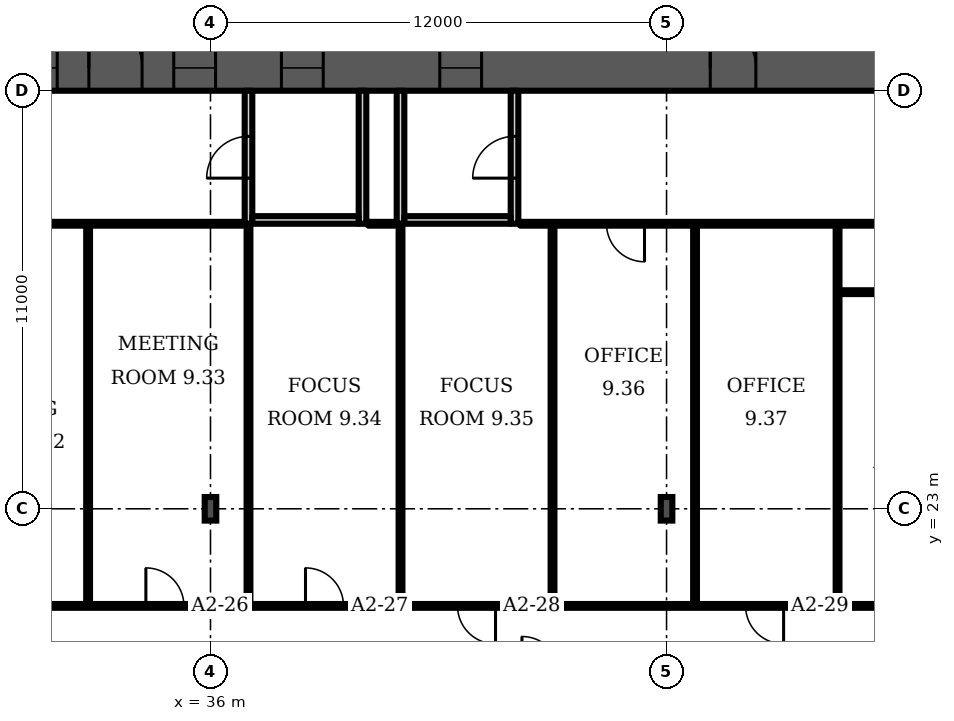
"""IFC4 building model, lengths in metres.
Left out: names, types, materials, properties, quantities, classifications, styles, units other than length and angle.
Written with IfcOpenShell. Run it as: python <this file> out.ifc"""

import sys

from ifc_helpers import new_model, si_unit, direction, frame, frame_2d, origin, origin_2d, place, context, subcontext, project, spatial, rectangle, i_section, extrude, element, fill, save


model = new_model("IFC4")
c1 = context("Model", 3, precision=1e-05, world=origin(), true_north=direction((0.0, 1.0)))
c2 = subcontext(c1, "Body", "Model", "MODEL_VIEW")
j1 = project(units=[si_unit("LENGTHUNIT", "METRE"), si_unit("PLANEANGLEUNIT", "RADIAN")], contexts=[c1])
p1 = place(None, origin())
s1 = spatial("IfcSite", under=j1, at=p1, CompositionType="ELEMENT")
p2 = place(p1, origin())
s2 = spatial("IfcBuilding", under=s1, at=p2, CompositionType="ELEMENT")
p3 = place(p2, frame((0.0, 0.0, 52.3)))
s3 = spatial("IfcBuildingStorey", under=s2, at=p3, CompositionType="ELEMENT", Elevation=52.3)
p4 = place(p3, frame((9.0, 34.6, 0.0), z_axis=(0.0, 0.0, 1.0), x_axis=(1.0, 0.0, 0.0)))
e1 = element("IfcWall", 1, at=p4, inside=s3, PredefinedType="SHEAR", context=c2, shape_type="SweptSolid", body=[
    extrude(rectangle(XDim=56.0, YDim=1.2, at=frame_2d((28.0, 0.0))), origin(), (0.0, 0.0, 1.0), 3.6),
])
p5 = place(p4, frame((2.0, 0.0, 0.0)))
e2 = element("IfcOpeningElement", 2, at=p5, cuts=e1, PredefinedType="OPENING", context=c2, shape_type="SweptSolid", body=[
    extrude(rectangle(XDim=1.0, YDim=2.1, at=frame_2d((0.5, 1.05))), frame((0.0, 0.61, 0.0), z_axis=(0.0, -1.0, 0.0), x_axis=(1.0, 0.0, 0.0)), (0.0, 0.0, 1.0), 1.22),
])
p6 = place(p4, frame((4.6, 0.0, 0.0)))
e3 = element("IfcOpeningElement", 3, at=p6, cuts=e1, PredefinedType="OPENING", context=c2, shape_type="SweptSolid", body=[
    extrude(rectangle(XDim=1.0, YDim=2.1, at=frame_2d((0.5, 1.05))), frame((0.0, 0.61, 0.0), z_axis=(0.0, -1.0, 0.0), x_axis=(1.0, 0.0, 0.0)), (0.0, 0.0, 1.0), 1.22),
])
p7 = place(p4, frame((7.867, 0.0, 0.0)))
e4 = element("IfcOpeningElement", 4, at=p7, cuts=e1, PredefinedType="OPENING", context=c2, shape_type="SweptSolid", body=[
    extrude(rectangle(XDim=1.1, YDim=2.1, at=frame_2d((0.55, 1.05))), frame((0.0, 0.61, 0.0), z_axis=(0.0, -1.0, 0.0), x_axis=(1.0, 0.0, 0.0)), (0.0, 0.0, 1.0), 1.22),
])
p8 = place(p4, frame((12.033, 0.0, 0.0)))
e5 = element("IfcOpeningElement", 5, at=p8, cuts=e1, PredefinedType="OPENING", context=c2, shape_type="SweptSolid", body=[
    extrude(rectangle(XDim=1.1, YDim=2.1, at=frame_2d((0.55, 1.05))), frame((0.0, 0.61, 0.0), z_axis=(0.0, -1.0, 0.0), x_axis=(1.0, 0.0, 0.0)), (0.0, 0.0, 1.0), 1.22),
])
p9 = place(p4, frame((9.8, 0.0, 0.0)))
e6 = element("IfcOpeningElement", 6, at=p9, cuts=e1, PredefinedType="OPENING", context=c2, shape_type="SweptSolid", body=[
    extrude(rectangle(XDim=1.4, YDim=2.1, at=frame_2d((0.7, 1.05))), frame((0.0, 0.61, 0.0), z_axis=(0.0, -1.0, 0.0), x_axis=(1.0, 0.0, 0.0)), (0.0, 0.0, 1.0), 1.22),
])
p10 = place(p4, frame((14.65, 0.0, 0.0)))
e7 = element("IfcOpeningElement", 7, at=p10, cuts=e1, PredefinedType="OPENING", context=c2, shape_type="SweptSolid", body=[
    extrude(rectangle(XDim=1.2, YDim=2.1, at=frame_2d((0.6, 1.05))), frame((0.0, 0.61, 0.0), z_axis=(0.0, -1.0, 0.0), x_axis=(1.0, 0.0, 0.0)), (0.0, 0.0, 1.0), 1.22),
])
p11 = place(p4, frame((21.867, 0.0, 0.0)))
e8 = element("IfcOpeningElement", 8, at=p11, cuts=e1, PredefinedType="OPENING", context=c2, shape_type="SweptSolid", body=[
    extrude(rectangle(XDim=1.1, YDim=2.1, at=frame_2d((0.55, 1.05))), frame((0.0, 0.61, 0.0), z_axis=(0.0, -1.0, 0.0), x_axis=(1.0, 0.0, 0.0)), (0.0, 0.0, 1.0), 1.22),
])
p12 = place(p4, frame((26.033, 0.0, 0.0)))
e9 = element("IfcOpeningElement", 9, at=p12, cuts=e1, PredefinedType="OPENING", context=c2, shape_type="SweptSolid", body=[
    extrude(rectangle(XDim=1.1, YDim=2.1, at=frame_2d((0.55, 1.05))), frame((0.0, 0.61, 0.0), z_axis=(0.0, -1.0, 0.0), x_axis=(1.0, 0.0, 0.0)), (0.0, 0.0, 1.0), 1.22),
])
p13 = place(p4, frame((23.8, 0.0, 0.0)))
e10 = element("IfcOpeningElement", 10, at=p13, cuts=e1, PredefinedType="OPENING", context=c2, shape_type="SweptSolid", body=[
    extrude(rectangle(XDim=1.4, YDim=2.1, at=frame_2d((0.7, 1.05))), frame((0.0, 0.61, 0.0), z_axis=(0.0, -1.0, 0.0), x_axis=(1.0, 0.0, 0.0)), (0.0, 0.0, 1.0), 1.22),
])
p14 = place(p4, frame((28.867, 0.0, 0.0)))
e11 = element("IfcOpeningElement", 11, at=p14, cuts=e1, PredefinedType="OPENING", context=c2, shape_type="SweptSolid", body=[
    extrude(rectangle(XDim=1.1, YDim=2.1, at=frame_2d((0.55, 1.05))), frame((0.0, 0.61, 0.0), z_axis=(0.0, -1.0, 0.0), x_axis=(1.0, 0.0, 0.0)), (0.0, 0.0, 1.0), 1.22),
])
p15 = place(p4, frame((33.033, 0.0, 0.0)))
e12 = element("IfcOpeningElement", 12, at=p15, cuts=e1, PredefinedType="OPENING", context=c2, shape_type="SweptSolid", body=[
    extrude(rectangle(XDim=1.1, YDim=2.1, at=frame_2d((0.55, 1.05))), frame((0.0, 0.61, 0.0), z_axis=(0.0, -1.0, 0.0), x_axis=(1.0, 0.0, 0.0)), (0.0, 0.0, 1.0), 1.22),
])
p16 = place(p4, frame((40.15, 0.0, 0.0)))
e13 = element("IfcOpeningElement", 13, at=p16, cuts=e1, PredefinedType="OPENING", context=c2, shape_type="SweptSolid", body=[
    extrude(rectangle(XDim=1.2, YDim=2.1, at=frame_2d((0.6, 1.05))), frame((0.0, 0.61, 0.0), z_axis=(0.0, -1.0, 0.0), x_axis=(1.0, 0.0, 0.0)), (0.0, 0.0, 1.0), 1.22),
])
p17 = place(p4, frame((44.8, 0.0, 0.0)))
e14 = element("IfcOpeningElement", 14, at=p17, cuts=e1, PredefinedType="OPENING", context=c2, shape_type="SweptSolid", body=[
    extrude(rectangle(XDim=1.4, YDim=2.1, at=frame_2d((0.7, 1.05))), frame((0.0, 0.61, 0.0), z_axis=(0.0, -1.0, 0.0), x_axis=(1.0, 0.0, 0.0)), (0.0, 0.0, 1.0), 1.22),
])
p18 = place(p4, frame((49.867, 0.0, 0.0)))
e15 = element("IfcOpeningElement", 15, at=p18, cuts=e1, PredefinedType="OPENING", context=c2, shape_type="SweptSolid", body=[
    extrude(rectangle(XDim=1.1, YDim=2.1, at=frame_2d((0.55, 1.05))), frame((0.0, 0.61, 0.0), z_axis=(0.0, -1.0, 0.0), x_axis=(1.0, 0.0, 0.0)), (0.0, 0.0, 1.0), 1.22),
])
p19 = place(p4, frame((53.5, 0.0, 0.0)))
e16 = element("IfcOpeningElement", 16, at=p19, cuts=e1, PredefinedType="OPENING", context=c2, shape_type="SweptSolid", body=[
    extrude(rectangle(XDim=1.1, YDim=2.1, at=frame_2d((0.55, 1.05))), frame((0.0, 0.61, 0.0), z_axis=(0.0, -1.0, 0.0), x_axis=(1.0, 0.0, 0.0)), (0.0, 0.0, 1.0), 1.22),
])
p20 = place(p4, frame((51.567, 0.0, 0.0)))
e17 = element("IfcOpeningElement", 17, at=p20, cuts=e1, PredefinedType="OPENING", context=c2, shape_type="SweptSolid", body=[
    extrude(rectangle(XDim=1.4, YDim=2.1, at=frame_2d((0.7, 1.05))), frame((0.0, 0.61, 0.0), z_axis=(0.0, -1.0, 0.0), x_axis=(1.0, 0.0, 0.0)), (0.0, 0.0, 1.0), 1.22),
])
for number, where, z_axis, x_axis in (
    (18, (36.0, 23.0, 0.0), (0.0, 0.0, 1.0), (1.0, 0.0, 0.0)),
    (19, (48.0, 23.0, 0.0), (0.0, 0.0, 1.0), (1.0, 0.0, 0.0)),
):
    element("IfcColumn", number, at=place(p3, frame(where, z_axis=z_axis, x_axis=x_axis)), inside=s3, PredefinedType="COLUMN", context=c2, shape_type="SweptSolid", body=[
        extrude(i_section(OverallWidth=0.305, OverallDepth=0.62, WebThickness=0.021, FlangeThickness=0.04, FilletRadius=0.027, at=origin_2d()), origin(), (0.0, 0.0, 1.0), 3.6),
    ])
p21 = place(p3, frame((37.0, 30.5, 0.0), z_axis=(0.0, 0.0, 1.0), x_axis=(0.0, 1.0, 0.0)))
e20 = element("IfcWall", 20, at=p21, inside=s3, PredefinedType="PARTITIONING", context=c2, shape_type="SweptSolid", body=[
    extrude(rectangle(XDim=3.5, YDim=0.2, at=frame_2d((1.75, 0.0))), origin(), (0.0, 0.0, 1.0), 3.2),
])
p22 = place(p21, frame((1.2, 0.0, 0.0)))
e21 = element("IfcOpeningElement", 21, at=p22, cuts=e20, PredefinedType="OPENING", context=c2, shape_type="SweptSolid", body=[
    extrude(rectangle(XDim=1.1, YDim=2.1, at=frame_2d((0.55, 1.05))), frame((0.0, 0.11, 0.0), z_axis=(0.0, -1.0, 0.0), x_axis=(1.0, 0.0, 0.0)), (0.0, 0.0, 1.0), 0.22),
])
p23 = place(p3, frame((40.0, 30.5, 0.0), z_axis=(0.0, 0.0, 1.0), x_axis=(0.0, 1.0, 0.0)))
e22 = element("IfcWall", 22, at=p23, inside=s3, PredefinedType="PARTITIONING", context=c2, shape_type="SweptSolid", body=[
    extrude(rectangle(XDim=3.5, YDim=0.2, at=frame_2d((1.75, 0.0))), origin(), (0.0, 0.0, 1.0), 3.2),
])
p24 = place(p3, frame((37.1, 30.6, 0.0), z_axis=(0.0, 0.0, 1.0), x_axis=(1.0, 0.0, 0.0)))
e23 = element("IfcWall", 23, at=p24, inside=s3, PredefinedType="PARTITIONING", context=c2, shape_type="SweptSolid", body=[
    extrude(rectangle(XDim=2.8, YDim=0.2, at=frame_2d((1.4, 0.0))), origin(), (0.0, 0.0, 1.0), 3.2),
])
p25 = place(p3, frame((41.0, 30.5, 0.0), z_axis=(0.0, 0.0, 1.0), x_axis=(0.0, 1.0, 0.0)))
e24 = element("IfcWall", 24, at=p25, inside=s3, PredefinedType="PARTITIONING", context=c2, shape_type="SweptSolid", body=[
    extrude(rectangle(XDim=3.5, YDim=0.2, at=frame_2d((1.75, 0.0))), origin(), (0.0, 0.0, 1.0), 3.2),
])
p26 = place(p3, frame((44.0, 30.5, 0.0), z_axis=(0.0, 0.0, 1.0), x_axis=(0.0, 1.0, 0.0)))
e25 = element("IfcWall", 25, at=p26, inside=s3, PredefinedType="PARTITIONING", context=c2, shape_type="SweptSolid", body=[
    extrude(rectangle(XDim=3.5, YDim=0.2, at=frame_2d((1.75, 0.0))), origin(), (0.0, 0.0, 1.0), 3.2),
])
p27 = place(p26, frame((1.2, 0.0, 0.0)))
e26 = element("IfcOpeningElement", 26, at=p27, cuts=e25, PredefinedType="OPENING", context=c2, shape_type="SweptSolid", body=[
    extrude(rectangle(XDim=1.1, YDim=2.1, at=frame_2d((0.55, 1.05))), frame((0.0, 0.11, 0.0), z_axis=(0.0, -1.0, 0.0), x_axis=(1.0, 0.0, 0.0)), (0.0, 0.0, 1.0), 0.22),
])
p28 = place(p3, frame((41.1, 30.6, 0.0), z_axis=(0.0, 0.0, 1.0), x_axis=(1.0, 0.0, 0.0)))
e27 = element("IfcWall", 27, at=p28, inside=s3, PredefinedType="PARTITIONING", context=c2, shape_type="SweptSolid", body=[
    extrude(rectangle(XDim=2.8, YDim=0.2, at=frame_2d((1.4, 0.0))), origin(), (0.0, 0.0, 1.0), 3.2),
])
p29 = place(p3, frame((11.2, 30.5, 0.0), z_axis=(0.0, 0.0, 1.0), x_axis=(1.0, 0.0, 0.0)))
e28 = element("IfcWall", 28, at=p29, inside=s3, PredefinedType="PARTITIONING", context=c2, shape_type="SweptSolid", body=[
    extrude(rectangle(XDim=25.65, YDim=0.1, at=frame_2d((12.825, 0.0))), origin(), (0.0, 0.0, 1.0), 3.2),
])
p30 = place(p29, frame((0.195, 0.0, 0.0)))
e29 = element("IfcOpeningElement", 29, at=p30, cuts=e28, PredefinedType="OPENING", context=c2, shape_type="SweptSolid", body=[
    extrude(rectangle(XDim=1.0, YDim=2.1, at=frame_2d((0.5, 1.05))), frame((0.0, 0.06, 0.0), z_axis=(0.0, -1.0, 0.0), x_axis=(1.0, 0.0, 0.0)), (0.0, 0.0, 1.0), 0.12),
])
p31 = place(p29, frame((14.755, 0.0, 0.0)))
e30 = element("IfcOpeningElement", 30, at=p31, cuts=e28, PredefinedType="OPENING", context=c2, shape_type="SweptSolid", body=[
    extrude(rectangle(XDim=1.0, YDim=2.1, at=frame_2d((0.5, 1.05))), frame((0.0, 0.06, 0.0), z_axis=(0.0, -1.0, 0.0), x_axis=(1.0, 0.0, 0.0)), (0.0, 0.0, 1.0), 0.12),
])
p32 = place(p29, frame((18.975, 0.0, 0.0)))
e31 = element("IfcOpeningElement", 31, at=p32, cuts=e28, PredefinedType="OPENING", context=c2, shape_type="SweptSolid", body=[
    extrude(rectangle(XDim=1.0, YDim=2.1, at=frame_2d((0.5, 1.05))), frame((0.0, 0.06, 0.0), z_axis=(0.0, -1.0, 0.0), x_axis=(1.0, 0.0, 0.0)), (0.0, 0.0, 1.0), 0.12),
])
p33 = place(p3, frame((11.505, 20.445, 0.0), z_axis=(0.0, 0.0, 1.0), x_axis=(1.0, 0.0, 0.0)))
e32 = element("IfcWall", 32, at=p33, inside=s3, PredefinedType="PARTITIONING", context=c2, shape_type="SweptSolid", body=[
    extrude(rectangle(XDim=58.82, YDim=0.1, at=frame_2d((29.41, 0.0))), origin(), (0.0, 0.0, 1.0), 3.2),
])
p34 = place(p33, frame((0.21, 0.0, 0.0)))
e33 = element("IfcOpeningElement", 33, at=p34, cuts=e32, PredefinedType="OPENING", context=c2, shape_type="SweptSolid", body=[
    extrude(rectangle(XDim=1.0, YDim=2.1, at=frame_2d((0.5, 1.05))), frame((0.0, 0.06, 0.0), z_axis=(0.0, -1.0, 0.0), x_axis=(1.0, 0.0, 0.0)), (0.0, 0.0, 1.0), 0.12),
])
p35 = place(p33, frame((8.33, 0.0, 0.0)))
e34 = element("IfcOpeningElement", 34, at=p35, cuts=e32, PredefinedType="OPENING", context=c2, shape_type="SweptSolid", body=[
    extrude(rectangle(XDim=1.0, YDim=2.1, at=frame_2d((0.5, 1.05))), frame((0.0, 0.06, 0.0), z_axis=(0.0, -1.0, 0.0), x_axis=(1.0, 0.0, 0.0)), (0.0, 0.0, 1.0), 0.12),
])
p36 = place(p33, frame((22.795, 0.0, 0.0)))
e35 = element("IfcOpeningElement", 35, at=p36, cuts=e32, PredefinedType="OPENING", context=c2, shape_type="SweptSolid", body=[
    extrude(rectangle(XDim=1.0, YDim=2.1, at=frame_2d((0.5, 1.05))), frame((0.0, 0.06, 0.0), z_axis=(0.0, -1.0, 0.0), x_axis=(1.0, 0.0, 0.0)), (0.0, 0.0, 1.0), 0.12),
])
p37 = place(p33, frame((26.995, 0.0, 0.0)))
e36 = element("IfcOpeningElement", 36, at=p37, cuts=e32, PredefinedType="OPENING", context=c2, shape_type="SweptSolid", body=[
    extrude(rectangle(XDim=1.0, YDim=2.1, at=frame_2d((0.5, 1.05))), frame((0.0, 0.06, 0.0), z_axis=(0.0, -1.0, 0.0), x_axis=(1.0, 0.0, 0.0)), (0.0, 0.0, 1.0), 0.12),
])
p38 = place(p33, frame((30.995, 0.0, 0.0)))
e37 = element("IfcOpeningElement", 37, at=p38, cuts=e32, PredefinedType="OPENING", context=c2, shape_type="SweptSolid", body=[
    extrude(rectangle(XDim=1.0, YDim=2.1, at=frame_2d((0.5, 1.05))), frame((0.0, 0.06, 0.0), z_axis=(0.0, -1.0, 0.0), x_axis=(1.0, 0.0, 0.0)), (0.0, 0.0, 1.0), 0.12),
])
p39 = place(p33, frame((38.575, 0.0, 0.0)))
e38 = element("IfcOpeningElement", 38, at=p39, cuts=e32, PredefinedType="OPENING", context=c2, shape_type="SweptSolid", body=[
    extrude(rectangle(XDim=1.0, YDim=2.1, at=frame_2d((0.5, 1.05))), frame((0.0, 0.06, 0.0), z_axis=(0.0, -1.0, 0.0), x_axis=(1.0, 0.0, 0.0)), (0.0, 0.0, 1.0), 0.12),
])
p40 = place(p33, frame((54.12, 0.0, 0.0)))
e39 = element("IfcOpeningElement", 39, at=p40, cuts=e32, PredefinedType="OPENING", context=c2, shape_type="SweptSolid", body=[
    extrude(rectangle(XDim=1.8, YDim=2.1, at=frame_2d((0.9, 1.05))), frame((0.0, 0.06, 0.0), z_axis=(0.0, -1.0, 0.0), x_axis=(1.0, 0.0, 0.0)), (0.0, 0.0, 1.0), 0.12),
])
for number, where, z_axis, x_axis in (
    (40, (32.78, 20.445, 0.0), (0.0, 0.0, 1.0), (0.0, 1.0, 0.0)),
    (41, (37.0, 20.445, 0.0), (0.0, 0.0, 1.0), (0.0, 1.0, 0.0)),
    (42, (41.0, 20.445, 0.0), (0.0, 0.0, 1.0), (0.0, 1.0, 0.0)),
    (43, (45.0, 20.445, 0.0), (0.0, 0.0, 1.0), (0.0, 1.0, 0.0)),
    (44, (48.75, 20.445, 0.0), (0.0, 0.0, 1.0), (0.0, 1.0, 0.0)),
):
    element("IfcWall", number, at=place(p3, frame(where, z_axis=z_axis, x_axis=x_axis)), inside=s3, PredefinedType="PARTITIONING", context=c2, shape_type="SweptSolid", body=[
        extrude(rectangle(XDim=10.055, YDim=0.1, at=frame_2d((5.027, 0.0))), origin(), (0.0, 0.0, 1.0), 3.2),
    ])
p41 = place(p3, frame((52.5, 20.445, 0.0), z_axis=(0.0, 0.0, 1.0), x_axis=(0.0, 1.0, 0.0)))
e45 = element("IfcWall", 45, at=p41, inside=s3, PredefinedType="PARTITIONING", context=c2, shape_type="SweptSolid", body=[
    extrude(rectangle(XDim=10.045, YDim=0.1, at=frame_2d((5.022, 0.0))), origin(), (0.0, 0.0, 1.0), 3.2),
])
p42 = place(p3, frame((52.5, 28.7, 0.0), z_axis=(0.0, 0.0, 1.0), x_axis=(1.0, 0.0, 0.0)))
e46 = element("IfcWall", 46, at=p42, inside=s3, PredefinedType="PARTITIONING", context=c2, shape_type="SweptSolid", body=[
    extrude(rectangle(XDim=10.335, YDim=0.1, at=frame_2d((5.167, 0.0))), origin(), (0.0, 0.0, 1.0), 3.2),
])
p43 = place(p42, frame((1.67, 0.0, 0.0)))
e47 = element("IfcOpeningElement", 47, at=p43, cuts=e46, PredefinedType="OPENING", context=c2, shape_type="SweptSolid", body=[
    extrude(rectangle(XDim=0.9, YDim=2.1, at=frame_2d((0.45, 1.05))), frame((0.0, 0.06, 0.0), z_axis=(0.0, -1.0, 0.0), x_axis=(1.0, 0.0, 0.0)), (0.0, 0.0, 1.0), 0.12),
])
p44 = place(p42, frame((5.555, 0.0, 0.0)))
e48 = element("IfcOpeningElement", 48, at=p44, cuts=e46, PredefinedType="OPENING", context=c2, shape_type="SweptSolid", body=[
    extrude(rectangle(XDim=0.9, YDim=2.1, at=frame_2d((0.45, 1.05))), frame((0.0, 0.06, 0.0), z_axis=(0.0, -1.0, 0.0), x_axis=(1.0, 0.0, 0.0)), (0.0, 0.0, 1.0), 0.12),
])
p45 = place(p42, frame((8.675, 0.0, 0.0)))
e49 = element("IfcOpeningElement", 49, at=p45, cuts=e46, PredefinedType="OPENING", context=c2, shape_type="SweptSolid", body=[
    extrude(rectangle(XDim=1.0, YDim=2.1, at=frame_2d((0.5, 1.05))), frame((0.0, 0.06, 0.0), z_axis=(0.0, -1.0, 0.0), x_axis=(1.0, 0.0, 0.0)), (0.0, 0.0, 1.0), 0.12),
])
p46 = place(p3, frame((40.15, 30.5, 0.0), z_axis=(0.0, 0.0, 1.0), x_axis=(1.0, 0.0, 0.0)))
e50 = element("IfcWall", 50, at=p46, inside=s3, PredefinedType="PARTITIONING", context=c2, shape_type="SweptSolid", body=[
    extrude(rectangle(XDim=0.7, YDim=0.1, at=frame_2d((0.35, 0.0))), origin(), (0.0, 0.0, 1.0), 3.2),
])
p47 = place(p3, frame((44.15, 30.5, 0.0), z_axis=(0.0, 0.0, 1.0), x_axis=(1.0, 0.0, 0.0)))
e51 = element("IfcWall", 51, at=p47, inside=s3, PredefinedType="PARTITIONING", context=c2, shape_type="SweptSolid", body=[
    extrude(rectangle(XDim=20.85, YDim=0.1, at=frame_2d((10.425, 0.0))), origin(), (0.0, 0.0, 1.0), 3.2),
])
p48 = place(p47, frame((2.27, 0.0, 0.0)))
e52 = element("IfcOpeningElement", 52, at=p48, cuts=e51, PredefinedType="OPENING", context=c2, shape_type="SweptSolid", body=[
    extrude(rectangle(XDim=1.0, YDim=2.1, at=frame_2d((0.5, 1.05))), frame((0.0, 0.06, 0.0), z_axis=(0.0, -1.0, 0.0), x_axis=(1.0, 0.0, 0.0)), (0.0, 0.0, 1.0), 0.12),
])
p49 = place(p11, origin())
e53 = element("IfcDoor", 53, at=p49, inside=s3, OperationType="DOUBLE_DOOR_SLIDING", PredefinedType="DOOR", context=c2, shape_type="SweptSolid", body=[
    extrude(rectangle(XDim=1.1, YDim=2.1, at=frame_2d((0.55, 1.05))), frame((0.0, 0.025, 0.0), z_axis=(0.0, -1.0, 0.0), x_axis=(1.0, 0.0, 0.0)), (0.0, 0.0, 1.0), 0.05),
])
fill(e8, e53)
p50 = place(p12, origin())
e54 = element("IfcDoor", 54, at=p50, inside=s3, OperationType="DOUBLE_DOOR_SLIDING", PredefinedType="DOOR", context=c2, shape_type="SweptSolid", body=[
    extrude(rectangle(XDim=1.1, YDim=2.1, at=frame_2d((0.55, 1.05))), frame((0.0, 0.025, 0.0), z_axis=(0.0, -1.0, 0.0), x_axis=(1.0, 0.0, 0.0)), (0.0, 0.0, 1.0), 0.05),
])
fill(e9, e54)
p51 = place(p13, origin())
e55 = element("IfcDoor", 55, at=p51, inside=s3, OperationType="DOUBLE_DOOR_SINGLE_SWING", PredefinedType="DOOR", context=c2, shape_type="SweptSolid", body=[
    extrude(rectangle(XDim=1.4, YDim=2.1, at=frame_2d((0.7, 1.05))), frame((0.0, 0.025, 0.0), z_axis=(0.0, -1.0, 0.0), x_axis=(1.0, 0.0, 0.0)), (0.0, 0.0, 1.0), 0.05),
])
fill(e10, e55)
p52 = place(p14, origin())
e56 = element("IfcDoor", 56, at=p52, inside=s3, OperationType="DOUBLE_DOOR_SLIDING", PredefinedType="DOOR", context=c2, shape_type="SweptSolid", body=[
    extrude(rectangle(XDim=1.1, YDim=2.1, at=frame_2d((0.55, 1.05))), frame((0.0, 0.025, 0.0), z_axis=(0.0, -1.0, 0.0), x_axis=(1.0, 0.0, 0.0)), (0.0, 0.0, 1.0), 0.05),
])
fill(e11, e56)
p53 = place(p15, origin())
e57 = element("IfcDoor", 57, at=p53, inside=s3, OperationType="DOUBLE_DOOR_SLIDING", PredefinedType="DOOR", context=c2, shape_type="SweptSolid", body=[
    extrude(rectangle(XDim=1.1, YDim=2.1, at=frame_2d((0.55, 1.05))), frame((0.0, 0.025, 0.0), z_axis=(0.0, -1.0, 0.0), x_axis=(1.0, 0.0, 0.0)), (0.0, 0.0, 1.0), 0.05),
])
fill(e12, e57)
p54 = place(p16, origin())
e58 = element("IfcDoor", 58, at=p54, inside=s3, OperationType="SINGLE_SWING_LEFT", PredefinedType="DOOR", context=c2, shape_type="SweptSolid", body=[
    extrude(rectangle(XDim=1.2, YDim=2.1, at=frame_2d((0.6, 1.05))), frame((0.0, 0.025, 0.0), z_axis=(0.0, -1.0, 0.0), x_axis=(1.0, 0.0, 0.0)), (0.0, 0.0, 1.0), 0.05),
])
fill(e13, e58)
p55 = place(p22, origin())
e59 = element("IfcDoor", 59, at=p55, inside=s3, OperationType="SINGLE_SWING_LEFT", PredefinedType="DOOR", context=c2, shape_type="SweptSolid", body=[
    extrude(rectangle(XDim=1.1, YDim=2.1, at=frame_2d((0.55, 1.05))), frame((0.0, 0.025, 0.0), z_axis=(0.0, -1.0, 0.0), x_axis=(1.0, 0.0, 0.0)), (0.0, 0.0, 1.0), 0.05),
])
fill(e21, e59)
p56 = place(p27, origin())
e60 = element("IfcDoor", 60, at=p56, inside=s3, OperationType="SINGLE_SWING_LEFT", PredefinedType="DOOR", context=c2, shape_type="SweptSolid", body=[
    extrude(rectangle(XDim=1.1, YDim=2.1, at=frame_2d((0.55, 1.05))), frame((0.0, 0.025, 0.0), z_axis=(0.0, -1.0, 0.0), x_axis=(1.0, 0.0, 0.0)), (0.0, 0.0, 1.0), 0.05),
])
fill(e26, e60)
p57 = place(p36, origin())
e61 = element("IfcDoor", 61, at=p57, inside=s3, OperationType="SINGLE_SWING_LEFT", PredefinedType="DOOR", context=c2, shape_type="SweptSolid", body=[
    extrude(rectangle(XDim=1.0, YDim=2.1, at=frame_2d((0.5, 1.05))), frame((0.0, 0.025, 0.0), z_axis=(0.0, -1.0, 0.0), x_axis=(1.0, 0.0, 0.0)), (0.0, 0.0, 1.0), 0.05),
])
fill(e35, e61)
p58 = place(p37, origin())
e62 = element("IfcDoor", 62, at=p58, inside=s3, OperationType="SINGLE_SWING_LEFT", PredefinedType="DOOR", context=c2, shape_type="SweptSolid", body=[
    extrude(rectangle(XDim=1.0, YDim=2.1, at=frame_2d((0.5, 1.05))), frame((0.0, 0.025, 0.0), z_axis=(0.0, -1.0, 0.0), x_axis=(1.0, 0.0, 0.0)), (0.0, 0.0, 1.0), 0.05),
])
fill(e36, e62)
p59 = place(p38, origin())
e63 = element("IfcDoor", 63, at=p59, inside=s3, OperationType="SINGLE_SWING_RIGHT", PredefinedType="DOOR", context=c2, shape_type="SweptSolid", body=[
    extrude(rectangle(XDim=1.0, YDim=2.1, at=frame_2d((0.5, 1.05))), frame((0.0, 0.025, 0.0), z_axis=(0.0, -1.0, 0.0), x_axis=(1.0, 0.0, 0.0)), (0.0, 0.0, 1.0), 0.05),
])
fill(e37, e63)
p60 = place(p39, origin())
e64 = element("IfcDoor", 64, at=p60, inside=s3, OperationType="SINGLE_SWING_RIGHT", PredefinedType="DOOR", context=c2, shape_type="SweptSolid", body=[
    extrude(rectangle(XDim=1.0, YDim=2.1, at=frame_2d((0.5, 1.05))), frame((0.0, 0.025, 0.0), z_axis=(0.0, -1.0, 0.0), x_axis=(1.0, 0.0, 0.0)), (0.0, 0.0, 1.0), 0.05),
])
fill(e38, e64)
p61 = place(p48, origin())
e65 = element("IfcDoor", 65, at=p61, inside=s3, OperationType="SINGLE_SWING_RIGHT", PredefinedType="DOOR", context=c2, shape_type="SweptSolid", body=[
    extrude(rectangle(XDim=1.0, YDim=2.1, at=frame_2d((0.5, 1.05))), frame((0.0, 0.025, 0.0), z_axis=(0.0, -1.0, 0.0), x_axis=(1.0, 0.0, 0.0)), (0.0, 0.0, 1.0), 0.05),
])
fill(e52, e65)
save(model, sys.argv[1])
